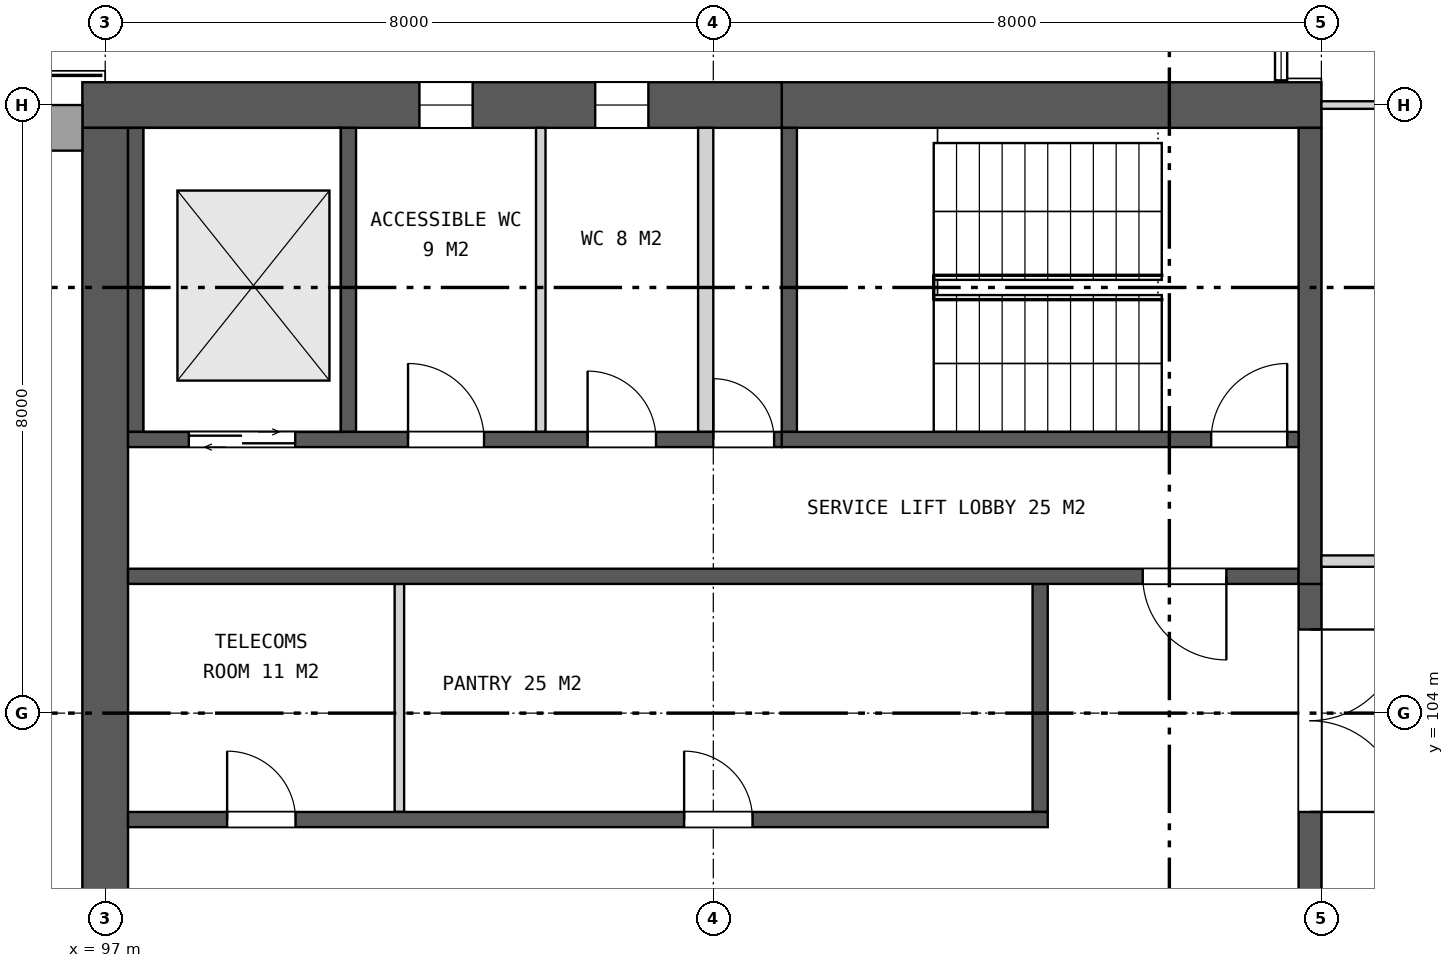
"""IFC4 building model, lengths in metres.
Left out: names, types, materials, properties, quantities, classifications, styles, units other than length and angle.
Written with IfcOpenShell. Run it as: python <this file> out.ifc"""

import sys

from ifc_helpers import new_model, si_unit, direction, frame, frame_2d, origin, place, context, subcontext, project, spatial, rectangle, extrude, element, fill, save


model = new_model("IFC4")
c1 = context("Model", 3, precision=1e-05, world=origin(), true_north=direction((0.0, 1.0)))
c2 = subcontext(c1, "Body", "Model", "MODEL_VIEW")
j1 = project(units=[si_unit("LENGTHUNIT", "METRE"), si_unit("PLANEANGLEUNIT", "RADIAN")], contexts=[c1])
p1 = place(None, origin())
s1 = spatial("IfcSite", under=j1, at=p1, CompositionType="ELEMENT")
p2 = place(p1, origin())
s2 = spatial("IfcBuilding", under=s1, at=p2, CompositionType="ELEMENT")
p3 = place(p2, frame((0.0, 0.0, 178.9)))
s3 = spatial("IfcBuildingStorey", under=s2, at=p3, CompositionType="ELEMENT", Elevation=178.9)
p4 = place(p3, frame((113.0, 112.0, 0.0), z_axis=(0.0, 0.0, 1.0), x_axis=(-1.0, 0.0, 0.0)))
e1 = element("IfcWall", 1, at=p4, inside=s3, PredefinedType="SHEAR", context=c2, shape_type="SweptSolid", body=[
    extrude(rectangle(XDim=7.1, YDim=0.6, at=frame_2d((3.55, 0.0))), origin(), (0.0, 0.0, 1.0), 4.2),
])
p5 = place(p3, frame((105.9, 112.0, 0.0), z_axis=(0.0, 0.0, 1.0), x_axis=(-1.0, 0.0, 0.0)))
e2 = element("IfcWall", 2, at=p5, inside=s3, PredefinedType="SHEAR", context=c2, shape_type="SweptSolid", body=[
    extrude(rectangle(XDim=9.2, YDim=0.6, at=frame_2d((4.6, 0.0))), origin(), (0.0, 0.0, 1.0), 4.2),
])
p6 = place(p5, frame((1.754, 0.0, 1.5)))
e3 = element("IfcOpeningElement", 3, at=p6, cuts=e2, PredefinedType="OPENING", context=c2, shape_type="SweptSolid", body=[
    extrude(rectangle(XDim=0.7, YDim=0.9, at=frame_2d((0.35, 0.45))), frame((0.0, 0.31, 0.0), z_axis=(0.0, -1.0, 0.0), x_axis=(1.0, 0.0, 0.0)), (0.0, 0.0, 1.0), 0.62),
])
p7 = place(p5, frame((4.066, 0.0, 1.5)))
e4 = element("IfcOpeningElement", 4, at=p7, cuts=e2, PredefinedType="OPENING", context=c2, shape_type="SweptSolid", body=[
    extrude(rectangle(XDim=0.7, YDim=0.9, at=frame_2d((0.35, 0.45))), frame((0.0, 0.31, 0.0), z_axis=(0.0, -1.0, 0.0), x_axis=(1.0, 0.0, 0.0)), (0.0, 0.0, 1.0), 0.62),
])
p8 = place(p3, frame((97.0, 111.7, 0.0), z_axis=(0.0, 0.0, 1.0), x_axis=(0.0, -1.0, 0.0)))
e5 = element("IfcWall", 5, at=p8, inside=s3, PredefinedType="SHEAR", context=c2, shape_type="SweptSolid", body=[
    extrude(rectangle(XDim=23.4, YDim=0.6, at=frame_2d((11.7, 0.0))), origin(), (0.0, 0.0, 1.0), 4.2),
])
p9 = place(p8, frame((10.5, 0.0, 0.0)))
e6 = element("IfcOpeningElement", 6, at=p9, cuts=e5, PredefinedType="OPENING", context=c2, shape_type="SweptSolid", body=[
    extrude(rectangle(XDim=2.4, YDim=2.4, at=frame_2d((1.2, 1.2))), frame((0.0, 0.31, 0.0), z_axis=(0.0, -1.0, 0.0), x_axis=(1.0, 0.0, 0.0)), (0.0, 0.0, 1.0), 0.62),
])
p10 = place(p8, frame((17.85, 0.0, 0.0)))
e7 = element("IfcOpeningElement", 7, at=p10, cuts=e5, PredefinedType="OPENING", context=c2, shape_type="SweptSolid", body=[
    extrude(rectangle(XDim=1.1, YDim=2.1, at=frame_2d((0.55, 1.05))), frame((0.0, 0.31, 0.0), z_axis=(0.0, -1.0, 0.0), x_axis=(1.0, 0.0, 0.0)), (0.0, 0.0, 1.0), 0.62),
])
p11 = place(p3, frame((112.85, 105.7, 0.0), z_axis=(0.0, 0.0, 1.0), x_axis=(0.0, -1.0, 0.0)))
e8 = element("IfcWall", 8, at=p11, inside=s3, PredefinedType="SHEAR", context=c2, shape_type="SweptSolid", body=[
    extrude(rectangle(XDim=11.4, YDim=0.3, at=frame_2d((5.7, 0.0))), origin(), (0.0, 0.0, 1.0), 4.2),
])
p12 = place(p11, frame((0.6, 0.0, 0.0)))
e9 = element("IfcOpeningElement", 9, at=p12, cuts=e8, PredefinedType="OPENING", context=c2, shape_type="SweptSolid", body=[
    extrude(rectangle(XDim=2.4, YDim=2.4, at=frame_2d((1.2, 1.2))), frame((0.0, 0.16, 0.0), z_axis=(0.0, -1.0, 0.0), x_axis=(1.0, 0.0, 0.0)), (0.0, 0.0, 1.0), 0.32),
])
p13 = place(p11, frame((4.5, 0.0, 0.0)))
e10 = element("IfcOpeningElement", 10, at=p13, cuts=e8, PredefinedType="OPENING", context=c2, shape_type="SweptSolid", body=[
    extrude(rectangle(XDim=2.4, YDim=2.4, at=frame_2d((1.2, 1.2))), frame((0.0, 0.16, 0.0), z_axis=(0.0, -1.0, 0.0), x_axis=(1.0, 0.0, 0.0)), (0.0, 0.0, 1.0), 0.32),
])
p14 = place(p11, frame((8.4, 0.0, 0.0)))
e11 = element("IfcOpeningElement", 11, at=p14, cuts=e8, PredefinedType="OPENING", context=c2, shape_type="SweptSolid", body=[
    extrude(rectangle(XDim=2.4, YDim=2.4, at=frame_2d((1.2, 1.2))), frame((0.0, 0.16, 0.0), z_axis=(0.0, -1.0, 0.0), x_axis=(1.0, 0.0, 0.0)), (0.0, 0.0, 1.0), 0.32),
])
p15 = place(p3, frame((109.3, 105.7, 0.0), z_axis=(0.0, 0.0, 1.0), x_axis=(0.0, -1.0, 0.0)))
e12 = element("IfcWall", 12, at=p15, inside=s3, PredefinedType="SHEAR", context=c2, shape_type="SweptSolid", body=[
    extrude(rectangle(XDim=3.0, YDim=0.2, at=frame_2d((1.5, 0.0))), origin(), (0.0, 0.0, 1.0), 4.2),
])
p16 = place(p3, frame((100.87, 105.7, 0.0), z_axis=(0.0, 0.0, 1.0), x_axis=(0.0, -1.0, 0.0)))
e13 = element("IfcWall", 13, at=p16, inside=s3, PredefinedType="PARTITIONING", context=c2, shape_type="SweptSolid", body=[
    extrude(rectangle(XDim=3.0, YDim=0.125, at=frame_2d((1.5, 0.0))), origin(), (0.0, 0.0, 1.0), 4.2),
])
p17 = place(p3, frame((109.4, 102.6, 0.0), z_axis=(0.0, 0.0, 1.0), x_axis=(-1.0, 0.0, 0.0)))
e14 = element("IfcWall", 14, at=p17, inside=s3, PredefinedType="SHEAR", context=c2, shape_type="SweptSolid", body=[
    extrude(rectangle(XDim=12.1, YDim=0.2, at=frame_2d((6.05, 0.0))), origin(), (0.0, 0.0, 1.0), 4.2),
])
p18 = place(p17, frame((3.884, 0.0, 0.0)))
e15 = element("IfcOpeningElement", 15, at=p18, cuts=e14, PredefinedType="OPENING", context=c2, shape_type="SweptSolid", body=[
    extrude(rectangle(XDim=0.9, YDim=2.1, at=frame_2d((0.45, 1.05))), frame((0.0, 0.11, 0.0), z_axis=(0.0, -1.0, 0.0), x_axis=(1.0, 0.0, 0.0)), (0.0, 0.0, 1.0), 0.22),
])
p19 = place(p17, frame((9.896, 0.0, 0.0)))
e16 = element("IfcOpeningElement", 16, at=p19, cuts=e14, PredefinedType="OPENING", context=c2, shape_type="SweptSolid", body=[
    extrude(rectangle(XDim=0.9, YDim=2.1, at=frame_2d((0.45, 1.05))), frame((0.0, 0.11, 0.0), z_axis=(0.0, -1.0, 0.0), x_axis=(1.0, 0.0, 0.0)), (0.0, 0.0, 1.0), 0.22),
])
p20 = place(p3, frame((112.7, 105.8, 0.0), z_axis=(0.0, 0.0, 1.0), x_axis=(-1.0, 0.0, 0.0)))
e17 = element("IfcWall", 17, at=p20, inside=s3, PredefinedType="SHEAR", context=c2, shape_type="SweptSolid", body=[
    extrude(rectangle(XDim=15.4, YDim=0.2, at=frame_2d((7.7, 0.0))), origin(), (0.0, 0.0, 1.0), 4.2),
])
p21 = place(p20, frame((0.95, 0.0, 0.0)))
e18 = element("IfcOpeningElement", 18, at=p21, cuts=e17, PredefinedType="OPENING", context=c2, shape_type="SweptSolid", body=[
    extrude(rectangle(XDim=1.1, YDim=2.1, at=frame_2d((0.55, 1.05))), frame((0.0, 0.11, 0.0), z_axis=(0.0, -1.0, 0.0), x_axis=(1.0, 0.0, 0.0)), (0.0, 0.0, 1.0), 0.22),
])
p22 = place(p3, frame((112.85, 111.7, 0.0), z_axis=(0.0, 0.0, 1.0), x_axis=(0.0, -1.0, 0.0)))
e19 = element("IfcWall", 19, at=p22, inside=s3, PredefinedType="SHEAR", context=c2, shape_type="SweptSolid", body=[
    extrude(rectangle(XDim=6.0, YDim=0.3, at=frame_2d((3.0, 0.0))), origin(), (0.0, 0.0, 1.0), 4.2),
])
for number, where, z_axis, x_axis in (
    (20, (106.0, 111.7, 0.0), (0.0, 0.0, 1.0), (0.0, -1.0, 0.0)),
    (21, (100.2, 111.7, 0.0), (0.0, 0.0, 1.0), (0.0, -1.0, 0.0)),
    (22, (97.4, 111.7, 0.0), (0.0, 0.0, 1.0), (0.0, -1.0, 0.0)),
):
    element("IfcWall", number, at=place(p3, frame(where, z_axis=z_axis, x_axis=x_axis)), inside=s3, PredefinedType="SHEAR", context=c2, shape_type="SweptSolid", body=[
        extrude(rectangle(XDim=4.0, YDim=0.2, at=frame_2d((2.0, 0.0))), origin(), (0.0, 0.0, 1.0), 4.2),
    ])
p23 = place(p3, frame((104.9, 111.7, 0.0), z_axis=(0.0, 0.0, 1.0), x_axis=(0.0, -1.0, 0.0)))
e23 = element("IfcWall", 23, at=p23, inside=s3, PredefinedType="PARTITIONING", context=c2, shape_type="SweptSolid", body=[
    extrude(rectangle(XDim=4.0, YDim=0.2, at=frame_2d((2.0, 0.0))), origin(), (0.0, 0.0, 1.0), 4.2),
])
p24 = place(p3, frame((102.73, 111.7, 0.0), z_axis=(0.0, 0.0, 1.0), x_axis=(0.0, -1.0, 0.0)))
e24 = element("IfcWall", 24, at=p24, inside=s3, PredefinedType="PARTITIONING", context=c2, shape_type="SweptSolid", body=[
    extrude(rectangle(XDim=4.0, YDim=0.125, at=frame_2d((2.0, 0.0))), origin(), (0.0, 0.0, 1.0), 4.2),
])
p25 = place(p3, frame((112.7, 107.6, 0.0), z_axis=(0.0, 0.0, 1.0), x_axis=(-1.0, 0.0, 0.0)))
e25 = element("IfcWall", 25, at=p25, inside=s3, PredefinedType="SHEAR", context=c2, shape_type="SweptSolid", body=[
    extrude(rectangle(XDim=6.8, YDim=0.2, at=frame_2d((3.4, 0.0))), origin(), (0.0, 0.0, 1.0), 4.2),
])
p26 = place(p25, frame((0.15, 0.0, 0.0)))
e26 = element("IfcOpeningElement", 26, at=p26, cuts=e25, PredefinedType="OPENING", context=c2, shape_type="SweptSolid", body=[
    extrude(rectangle(XDim=1.0, YDim=2.1, at=frame_2d((0.5, 1.05))), frame((0.0, 0.11, 0.0), z_axis=(0.0, -1.0, 0.0), x_axis=(1.0, 0.0, 0.0)), (0.0, 0.0, 1.0), 0.22),
])
p27 = place(p3, frame((105.9, 107.6, 0.0), z_axis=(0.0, 0.0, 1.0), x_axis=(-1.0, 0.0, 0.0)))
e27 = element("IfcWall", 27, at=p27, inside=s3, PredefinedType="SHEAR", context=c2, shape_type="SweptSolid", body=[
    extrude(rectangle(XDim=8.6, YDim=0.2, at=frame_2d((4.3, 0.0))), origin(), (0.0, 0.0, 1.0), 4.2),
])
p28 = place(p27, frame((0.1, 0.0, 0.0)))
e28 = element("IfcOpeningElement", 28, at=p28, cuts=e27, PredefinedType="OPENING", context=c2, shape_type="SweptSolid", body=[
    extrude(rectangle(XDim=0.8, YDim=2.1, at=frame_2d((0.4, 1.05))), frame((0.0, 0.11, 0.0), z_axis=(0.0, -1.0, 0.0), x_axis=(1.0, 0.0, 0.0)), (0.0, 0.0, 1.0), 0.22),
])
p29 = place(p27, frame((1.654, 0.0, 0.0)))
e29 = element("IfcOpeningElement", 29, at=p29, cuts=e27, PredefinedType="OPENING", context=c2, shape_type="SweptSolid", body=[
    extrude(rectangle(XDim=0.9, YDim=2.1, at=frame_2d((0.45, 1.05))), frame((0.0, 0.11, 0.0), z_axis=(0.0, -1.0, 0.0), x_axis=(1.0, 0.0, 0.0)), (0.0, 0.0, 1.0), 0.22),
])
p30 = place(p27, frame((3.916, 0.0, 0.0)))
e30 = element("IfcOpeningElement", 30, at=p30, cuts=e27, PredefinedType="OPENING", context=c2, shape_type="SweptSolid", body=[
    extrude(rectangle(XDim=1.0, YDim=2.1, at=frame_2d((0.5, 1.05))), frame((0.0, 0.11, 0.0), z_axis=(0.0, -1.0, 0.0), x_axis=(1.0, 0.0, 0.0)), (0.0, 0.0, 1.0), 0.22),
])
p31 = place(p27, frame((6.4, 0.0, 0.0)))
e31 = element("IfcOpeningElement", 31, at=p31, cuts=e27, PredefinedType="OPENING", context=c2, shape_type="SweptSolid", body=[
    extrude(rectangle(XDim=1.4, YDim=2.1, at=frame_2d((0.7, 1.05))), frame((0.0, 0.11, 0.0), z_axis=(0.0, -1.0, 0.0), x_axis=(1.0, 0.0, 0.0)), (0.0, 0.0, 1.0), 0.22),
])
p32 = place(p3, frame((89.6, 111.7, 0.0), z_axis=(0.0, 0.0, 1.0), x_axis=(1.0, 0.0, 0.0)))
e32 = element("IfcWall", 32, at=p32, inside=s3, PredefinedType="SOLIDWALL", context=c2, shape_type="SweptSolid", body=[
    extrude(rectangle(XDim=7.1, YDim=0.6, at=frame_2d((3.55, 0.0))), origin(), (0.0, 0.0, 1.0), 0.6),
])
p33 = place(p3, frame((113.0, 106.0, 0.0), z_axis=(0.0, 0.0, 1.0), x_axis=(1.0, 0.0, 0.0)))
e33 = element("IfcWall", 33, at=p33, inside=s3, PredefinedType="PARTITIONING", context=c2, shape_type="SweptSolid", body=[
    extrude(rectangle(XDim=5.525, YDim=0.15, at=frame_2d((2.762, 0.0))), origin(), (0.0, 0.0, 1.0), 3.44),
])
p34 = place(p3, frame((113.0, 112.0, 0.0), z_axis=(0.0, 0.0, 1.0), x_axis=(1.0, 0.0, 0.0)))
e34 = element("IfcWall", 34, at=p34, inside=s3, PredefinedType="PARTITIONING", context=c2, shape_type="SweptSolid", body=[
    extrude(rectangle(XDim=5.525, YDim=0.1, at=frame_2d((2.762, 0.0))), origin(), (0.0, 0.0, 1.0), 3.44),
])
p35 = place(p6, origin())
e35 = element("IfcWindow", 35, at=p35, inside=s3, PartitioningType="SINGLE_PANEL", PredefinedType="WINDOW", context=c2, shape_type="SweptSolid", body=[
    extrude(rectangle(XDim=0.7, YDim=0.9, at=frame_2d((0.35, 0.45))), frame((0.0, 0.03, 0.0), z_axis=(0.0, -1.0, 0.0), x_axis=(1.0, 0.0, 0.0)), (0.0, 0.0, 1.0), 0.06),
])
fill(e3, e35)
p36 = place(p7, origin())
e36 = element("IfcWindow", 36, at=p36, inside=s3, PartitioningType="SINGLE_PANEL", PredefinedType="WINDOW", context=c2, shape_type="SweptSolid", body=[
    extrude(rectangle(XDim=0.7, YDim=0.9, at=frame_2d((0.35, 0.45))), frame((0.0, 0.03, 0.0), z_axis=(0.0, -1.0, 0.0), x_axis=(1.0, 0.0, 0.0)), (0.0, 0.0, 1.0), 0.06),
])
fill(e4, e36)
p37 = place(p12, origin())
e37 = element("IfcDoor", 37, at=p37, inside=s3, OperationType="DOUBLE_DOOR_SINGLE_SWING", PredefinedType="DOOR", context=c2, shape_type="SweptSolid", body=[
    extrude(rectangle(XDim=2.4, YDim=2.4, at=frame_2d((1.2, 1.2))), frame((0.0, 0.025, 0.0), z_axis=(0.0, -1.0, 0.0), x_axis=(1.0, 0.0, 0.0)), (0.0, 0.0, 1.0), 0.05),
])
fill(e9, e37)
p38 = place(p18, frame((0.9, 0.0, 0.0), z_axis=(0.0, 0.0, 1.0), x_axis=(-1.0, 0.0, 0.0)))
e38 = element("IfcDoor", 38, at=p38, inside=s3, OperationType="SINGLE_SWING_LEFT", PredefinedType="DOOR", context=c2, shape_type="SweptSolid", body=[
    extrude(rectangle(XDim=0.9, YDim=2.1, at=frame_2d((0.45, 1.05))), frame((0.0, 0.025, 0.0), z_axis=(0.0, -1.0, 0.0), x_axis=(1.0, 0.0, 0.0)), (0.0, 0.0, 1.0), 0.05),
])
fill(e15, e38)
p39 = place(p19, frame((0.9, 0.0, 0.0), z_axis=(0.0, 0.0, 1.0), x_axis=(-1.0, 0.0, 0.0)))
e39 = element("IfcDoor", 39, at=p39, inside=s3, OperationType="SINGLE_SWING_LEFT", PredefinedType="DOOR", context=c2, shape_type="SweptSolid", body=[
    extrude(rectangle(XDim=0.9, YDim=2.1, at=frame_2d((0.45, 1.05))), frame((0.0, 0.025, 0.0), z_axis=(0.0, -1.0, 0.0), x_axis=(1.0, 0.0, 0.0)), (0.0, 0.0, 1.0), 0.05),
])
fill(e16, e39)
p40 = place(p21, origin())
e40 = element("IfcDoor", 40, at=p40, inside=s3, OperationType="SINGLE_SWING_LEFT", PredefinedType="DOOR", context=c2, shape_type="SweptSolid", body=[
    extrude(rectangle(XDim=1.1, YDim=2.1, at=frame_2d((0.55, 1.05))), frame((0.0, 0.025, 0.0), z_axis=(0.0, -1.0, 0.0), x_axis=(1.0, 0.0, 0.0)), (0.0, 0.0, 1.0), 0.05),
])
fill(e18, e40)
p41 = place(p26, frame((1.0, 0.0, 0.0), z_axis=(0.0, 0.0, 1.0), x_axis=(-1.0, 0.0, 0.0)))
e41 = element("IfcDoor", 41, at=p41, inside=s3, OperationType="SINGLE_SWING_RIGHT", PredefinedType="DOOR", context=c2, shape_type="SweptSolid", body=[
    extrude(rectangle(XDim=1.0, YDim=2.1, at=frame_2d((0.5, 1.05))), frame((0.0, 0.025, 0.0), z_axis=(0.0, -1.0, 0.0), x_axis=(1.0, 0.0, 0.0)), (0.0, 0.0, 1.0), 0.05),
])
fill(e26, e41)
p42 = place(p28, frame((0.8, 0.0, 0.0), z_axis=(0.0, 0.0, 1.0), x_axis=(-1.0, 0.0, 0.0)))
e42 = element("IfcDoor", 42, at=p42, inside=s3, OperationType="SINGLE_SWING_LEFT", PredefinedType="DOOR", context=c2, shape_type="SweptSolid", body=[
    extrude(rectangle(XDim=0.8, YDim=2.1, at=frame_2d((0.4, 1.05))), frame((0.0, 0.025, 0.0), z_axis=(0.0, -1.0, 0.0), x_axis=(1.0, 0.0, 0.0)), (0.0, 0.0, 1.0), 0.05),
])
fill(e28, e42)
p43 = place(p29, frame((0.9, 0.0, 0.0), z_axis=(0.0, 0.0, 1.0), x_axis=(-1.0, 0.0, 0.0)))
e43 = element("IfcDoor", 43, at=p43, inside=s3, OperationType="SINGLE_SWING_LEFT", PredefinedType="DOOR", context=c2, shape_type="SweptSolid", body=[
    extrude(rectangle(XDim=0.9, YDim=2.1, at=frame_2d((0.45, 1.05))), frame((0.0, 0.025, 0.0), z_axis=(0.0, -1.0, 0.0), x_axis=(1.0, 0.0, 0.0)), (0.0, 0.0, 1.0), 0.05),
])
fill(e29, e43)
p44 = place(p30, frame((1.0, 0.0, 0.0), z_axis=(0.0, 0.0, 1.0), x_axis=(-1.0, 0.0, 0.0)))
e44 = element("IfcDoor", 44, at=p44, inside=s3, OperationType="SINGLE_SWING_LEFT", PredefinedType="DOOR", context=c2, shape_type="SweptSolid", body=[
    extrude(rectangle(XDim=1.0, YDim=2.1, at=frame_2d((0.5, 1.05))), frame((0.0, 0.025, 0.0), z_axis=(0.0, -1.0, 0.0), x_axis=(1.0, 0.0, 0.0)), (0.0, 0.0, 1.0), 0.05),
])
fill(e30, e44)
p45 = place(p31, origin())
e45 = element("IfcDoor", 45, at=p45, inside=s3, OperationType="DOUBLE_DOOR_SLIDING", PredefinedType="DOOR", context=c2, shape_type="SweptSolid", body=[
    extrude(rectangle(XDim=1.4, YDim=2.1, at=frame_2d((0.7, 1.05))), frame((0.0, 0.025, 0.0), z_axis=(0.0, -1.0, 0.0), x_axis=(1.0, 0.0, 0.0)), (0.0, 0.0, 1.0), 0.05),
])
fill(e31, e45)
save(model, sys.argv[1])
